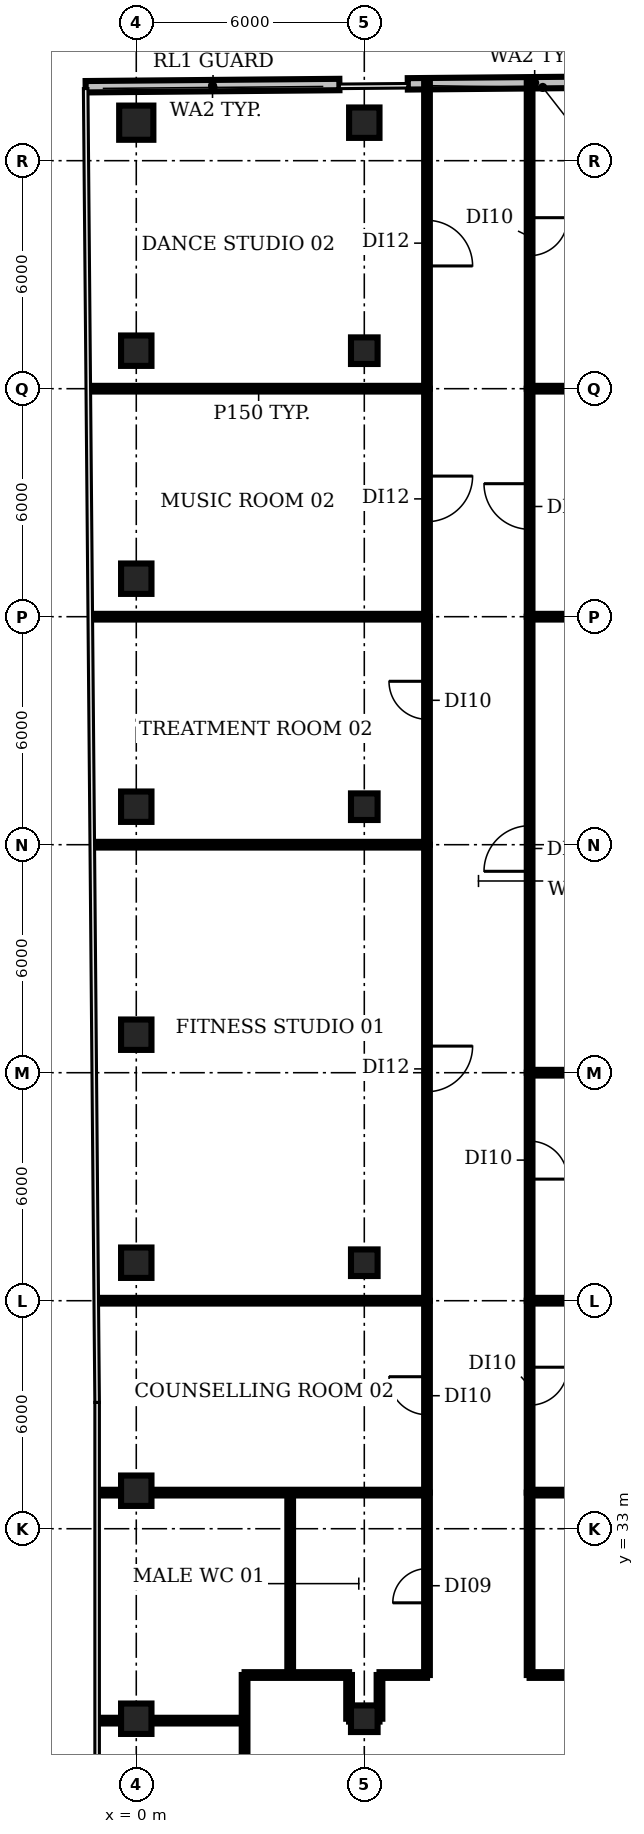
"""IFC4 building model, lengths in metres.
Left out: names, types, materials, properties, quantities, classifications, styles, units other than length and angle.
Written with IfcOpenShell. Run it as: python <this file> out.ifc"""

import sys

from ifc_helpers import new_model, si_unit, direction, frame, frame_2d, origin, origin_2d, place, context, subcontext, project, spatial, rectangle, circle, extrude, element, fill, save


model = new_model("IFC4")
c1 = context("Model", 3, precision=1e-05, world=origin(), true_north=direction((0.0, 1.0)))
c2 = subcontext(c1, "Body", "Model", "MODEL_VIEW")
j1 = project(units=[si_unit("LENGTHUNIT", "METRE"), si_unit("PLANEANGLEUNIT", "RADIAN")], contexts=[c1])
p1 = place(None, origin())
s1 = spatial("IfcSite", under=j1, at=p1, CompositionType="ELEMENT")
p2 = place(p1, origin())
s2 = spatial("IfcBuilding", under=s1, at=p2, CompositionType="ELEMENT")
p3 = place(p2, frame((0.0, 0.0, 226.4)))
s3 = spatial("IfcBuildingStorey", under=s2, at=p3, CompositionType="ELEMENT", Elevation=226.4)
for number, where, z_axis, x_axis in (
    (1, (0.0, 28.0, 0.0), (0.0, 0.0, 1.0), (1.0, 0.0, 0.0)),
    (2, (0.0, 34.0, 0.0), (0.0, 0.0, 1.0), (1.0, 0.0, 0.0)),
    (3, (0.0, 40.0, 0.0), (0.0, 0.0, 1.0), (1.0, 0.0, 0.0)),
    (4, (0.0, 46.0, 0.0), (0.0, 0.0, 1.0), (1.0, 0.0, 0.0)),
    (5, (0.0, 52.0, 0.0), (0.0, 0.0, 1.0), (1.0, 0.0, 0.0)),
    (6, (0.0, 58.0, 0.0), (0.0, 0.0, 1.0), (1.0, 0.0, 0.0)),
    (7, (0.0, 64.0, 0.0), (0.0, 0.0, 1.0), (1.0, 0.0, 0.0)),
):
    element("IfcColumn", number, at=place(p3, frame(where, z_axis=z_axis, x_axis=x_axis)), inside=s3, PredefinedType="COLUMN", context=c2, shape_type="SweptSolid", body=[
        extrude(rectangle(XDim=0.8, YDim=0.8, at=origin_2d()), origin(), (0.0, 0.0, 1.0), 3.85),
    ])
p4 = place(p3, frame((0.0, 70.0, 0.0), z_axis=(0.0, 0.0, 1.0), x_axis=(1.0, 0.0, 0.0)))
e8 = element("IfcColumn", 8, at=p4, inside=s3, PredefinedType="COLUMN", context=c2, shape_type="SweptSolid", body=[
    extrude(circle(Radius=0.45, at=origin_2d()), origin(), (0.0, 0.0, 1.0), 3.85),
])
for number, where, z_axis, x_axis in (
    (9, (6.0, 28.0, 0.0), (0.0, 0.0, 1.0), (1.0, 0.0, 0.0)),
    (10, (6.0, 40.0, 0.0), (0.0, 0.0, 1.0), (1.0, 0.0, 0.0)),
    (11, (6.0, 52.0, 0.0), (0.0, 0.0, 1.0), (1.0, 0.0, 0.0)),
    (12, (6.0, 64.0, 0.0), (0.0, 0.0, 1.0), (1.0, 0.0, 0.0)),
):
    element("IfcColumn", number, at=place(p3, frame(where, z_axis=z_axis, x_axis=x_axis)), inside=s3, PredefinedType="COLUMN", context=c2, shape_type="SweptSolid", body=[
        extrude(rectangle(XDim=0.7, YDim=0.7, at=origin_2d()), origin(), (0.0, 0.0, 1.0), 3.85),
    ])
p5 = place(p3, frame((6.0, 70.0, 0.0), z_axis=(0.0, 0.0, 1.0), x_axis=(1.0, 0.0, 0.0)))
e13 = element("IfcColumn", 13, at=p5, inside=s3, PredefinedType="COLUMN", context=c2, shape_type="SweptSolid", body=[
    extrude(rectangle(XDim=0.8, YDim=0.8, at=origin_2d()), origin(), (0.0, 0.0, 1.0), 3.85),
])
p6 = place(p3, frame((13.821, 71.08, 0.0), z_axis=(0.0, 0.0, 1.0), x_axis=(-0.999961815264, -0.008738879401, 0.0)))
e14 = element("IfcWall", 14, at=p6, inside=s3, PredefinedType="SOLIDWALL", context=c2, shape_type="SweptSolid", body=[
    extrude(rectangle(XDim=6.677, YDim=0.3, at=frame_2d((3.338, 0.0))), origin(), (0.0, 0.0, 1.0), 3.85),
])
p7 = place(p3, frame((5.345, 71.004, 0.0), z_axis=(0.0, 0.0, 1.0), x_axis=(-0.999961818057, -0.008738559893, 0.0)))
e15 = element("IfcWall", 15, at=p7, inside=s3, PredefinedType="SOLIDWALL", context=c2, shape_type="SweptSolid", body=[
    extrude(rectangle(XDim=6.677, YDim=0.3, at=frame_2d((3.339, 0.0))), origin(), (0.0, 0.0, 1.0), 3.85),
])
p8 = place(p3, frame((-1.21, 63.0, 0.0), z_axis=(0.0, 0.0, 1.0), x_axis=(1.0, 0.0, 0.0)))
e16 = element("IfcWall", 16, at=p8, inside=s3, PredefinedType="PARTITIONING", context=c2, shape_type="SweptSolid", body=[
    extrude(rectangle(XDim=8.86, YDim=0.15, at=frame_2d((4.43, 0.0))), origin(), (0.0, 0.0, 1.0), 2.88),
])
p9 = place(p3, frame((-1.16, 57.0, 0.0), z_axis=(0.0, 0.0, 1.0), x_axis=(1.0, 0.0, 0.0)))
e17 = element("IfcWall", 17, at=p9, inside=s3, PredefinedType="PARTITIONING", context=c2, shape_type="SweptSolid", body=[
    extrude(rectangle(XDim=8.81, YDim=0.15, at=frame_2d((4.405, 0.0))), origin(), (0.0, 0.0, 1.0), 2.88),
])
p10 = place(p3, frame((-1.11, 51.0, 0.0), z_axis=(0.0, 0.0, 1.0), x_axis=(1.0, 0.0, 0.0)))
e18 = element("IfcWall", 18, at=p10, inside=s3, PredefinedType="PARTITIONING", context=c2, shape_type="SweptSolid", body=[
    extrude(rectangle(XDim=8.76, YDim=0.15, at=frame_2d((4.38, 0.0))), origin(), (0.0, 0.0, 1.0), 2.88),
])
p11 = place(p3, frame((-1.0, 39.0, 0.0), z_axis=(0.0, 0.0, 1.0), x_axis=(1.0, 0.0, 0.0)))
e19 = element("IfcWall", 19, at=p11, inside=s3, PredefinedType="PARTITIONING", context=c2, shape_type="SweptSolid", body=[
    extrude(rectangle(XDim=8.65, YDim=0.15, at=frame_2d((4.325, 0.0))), origin(), (0.0, 0.0, 1.0), 2.88),
])
p12 = place(p3, frame((-0.98, 27.95, 0.0), z_axis=(0.0, 0.0, 1.0), x_axis=(1.0, 0.0, 0.0)))
e20 = element("IfcWall", 20, at=p12, inside=s3, PredefinedType="PARTITIONING", context=c2, shape_type="SweptSolid", body=[
    extrude(rectangle(XDim=3.83, YDim=0.15, at=frame_2d((1.915, 0.0))), origin(), (0.0, 0.0, 1.0), 2.88),
])
p13 = place(p3, frame((-0.98, 33.95, 0.0), z_axis=(0.0, 0.0, 1.0), x_axis=(1.0, 0.0, 0.0)))
e21 = element("IfcWall", 21, at=p13, inside=s3, PredefinedType="PARTITIONING", context=c2, shape_type="SweptSolid", body=[
    extrude(rectangle(XDim=8.63, YDim=0.15, at=frame_2d((4.315, 0.0))), origin(), (0.0, 0.0, 1.0), 2.88),
])
p14 = place(p3, frame((2.85, 25.25, 0.0), z_axis=(0.0, 0.0, 1.0), x_axis=(0.0, 1.0, 0.0)))
e22 = element("IfcWall", 22, at=p14, inside=s3, PredefinedType="PARTITIONING", context=c2, shape_type="SweptSolid", body=[
    extrude(rectangle(XDim=3.9, YDim=0.15, at=frame_2d((1.95, 0.0))), origin(), (0.0, 0.0, 1.0), 2.88),
])
p15 = place(p3, frame((2.85, 29.15, 0.0), z_axis=(0.0, 0.0, 1.0), x_axis=(1.0, 0.0, 0.0)))
e23 = element("IfcWall", 23, at=p15, inside=s3, PredefinedType="PARTITIONING", context=c2, shape_type="SweptSolid", body=[
    extrude(rectangle(XDim=2.75, YDim=0.15, at=frame_2d((1.375, 0.0))), origin(), (0.0, 0.0, 1.0), 2.88),
])
p16 = place(p3, frame((4.05, 29.15, 0.0), z_axis=(0.0, 0.0, 1.0), x_axis=(0.0, 1.0, 0.0)))
e24 = element("IfcWall", 24, at=p16, inside=s3, PredefinedType="PARTITIONING", context=c2, shape_type="SweptSolid", body=[
    extrude(rectangle(XDim=4.8, YDim=0.15, at=frame_2d((2.4, 0.0))), origin(), (0.0, 0.0, 1.0), 2.88),
])
p17 = place(p3, frame((5.6, 28.0, 0.0), z_axis=(0.0, 0.0, 1.0), x_axis=(0.0, 1.0, 0.0)))
e25 = element("IfcWall", 25, at=p17, inside=s3, PredefinedType="PARTITIONING", context=c2, shape_type="SweptSolid", body=[
    extrude(rectangle(XDim=1.15, YDim=0.15, at=frame_2d((0.575, 0.0))), origin(), (0.0, 0.0, 1.0), 2.88),
])
p18 = place(p3, frame((5.6, 28.0, 0.0), z_axis=(0.0, 0.0, 1.0), x_axis=(1.0, 0.0, 0.0)))
e26 = element("IfcWall", 26, at=p18, inside=s3, PredefinedType="PARTITIONING", context=c2, shape_type="SweptSolid", body=[
    extrude(rectangle(XDim=0.8, YDim=0.15, at=frame_2d((0.4, 0.0))), origin(), (0.0, 0.0, 1.0), 2.88),
])
p19 = place(p3, frame((6.4, 28.0, 0.0), z_axis=(0.0, 0.0, 1.0), x_axis=(0.0, 1.0, 0.0)))
e27 = element("IfcWall", 27, at=p19, inside=s3, PredefinedType="PARTITIONING", context=c2, shape_type="SweptSolid", body=[
    extrude(rectangle(XDim=1.15, YDim=0.15, at=frame_2d((0.575, 0.0))), origin(), (0.0, 0.0, 1.0), 2.88),
])
p20 = place(p3, frame((6.4, 29.15, 0.0), z_axis=(0.0, 0.0, 1.0), x_axis=(1.0, 0.0, 0.0)))
e28 = element("IfcWall", 28, at=p20, inside=s3, PredefinedType="PARTITIONING", context=c2, shape_type="SweptSolid", body=[
    extrude(rectangle(XDim=1.25, YDim=0.15, at=frame_2d((0.625, 0.0))), origin(), (0.0, 0.0, 1.0), 2.88),
])
p21 = place(p3, frame((7.65, 29.15, 0.0), z_axis=(0.0, 0.0, 1.0), x_axis=(0.0, 1.0, 0.0)))
e29 = element("IfcWall", 29, at=p21, inside=s3, PredefinedType="PARTITIONING", context=c2, shape_type="SweptSolid", body=[
    extrude(rectangle(XDim=4.8, YDim=0.15, at=frame_2d((2.4, 0.0))), origin(), (0.0, 0.0, 1.0), 2.88),
])
p22 = place(p21, frame((1.9, 0.0, 0.0)))
e30 = element("IfcOpeningElement", 30, at=p22, cuts=e29, PredefinedType="OPENING", context=c2, shape_type="SweptSolid", body=[
    extrude(rectangle(XDim=0.9, YDim=2.1, at=frame_2d((0.45, 1.05))), frame((0.0, 0.085, 0.0), z_axis=(0.0, -1.0, 0.0), x_axis=(1.0, 0.0, 0.0)), (0.0, 0.0, 1.0), 0.17),
])
p23 = place(p3, frame((7.65, 33.95, 0.0), z_axis=(0.0, 0.0, 1.0), x_axis=(0.0, 1.0, 0.0)))
e31 = element("IfcWall", 31, at=p23, inside=s3, PredefinedType="PARTITIONING", context=c2, shape_type="SweptSolid", body=[
    extrude(rectangle(XDim=5.05, YDim=0.15, at=frame_2d((2.525, 0.0))), origin(), (0.0, 0.0, 1.0), 2.88),
])
p24 = place(p23, frame((2.05, 0.0, 0.0)))
e32 = element("IfcOpeningElement", 32, at=p24, cuts=e31, PredefinedType="OPENING", context=c2, shape_type="SweptSolid", body=[
    extrude(rectangle(XDim=1.0, YDim=2.1, at=frame_2d((0.5, 1.05))), frame((0.0, 0.085, 0.0), z_axis=(0.0, -1.0, 0.0), x_axis=(1.0, 0.0, 0.0)), (0.0, 0.0, 1.0), 0.17),
])
p25 = place(p3, frame((7.65, 51.0, 0.0), z_axis=(0.0, 0.0, 1.0), x_axis=(0.0, -1.0, 0.0)))
e33 = element("IfcWall", 33, at=p25, inside=s3, PredefinedType="PARTITIONING", context=c2, shape_type="SweptSolid", body=[
    extrude(rectangle(XDim=12.0, YDim=0.15, at=frame_2d((6.0, 0.0))), origin(), (0.0, 0.0, 1.0), 2.88),
])
p26 = place(p25, frame((5.3, 0.0, 0.0)))
e34 = element("IfcOpeningElement", 34, at=p26, cuts=e33, PredefinedType="OPENING", context=c2, shape_type="SweptSolid", body=[
    extrude(rectangle(XDim=1.2, YDim=2.1, at=frame_2d((0.6, 1.05))), frame((0.0, 0.085, 0.0), z_axis=(0.0, -1.0, 0.0), x_axis=(1.0, 0.0, 0.0)), (0.0, 0.0, 1.0), 0.17),
])
p27 = place(p3, frame((7.65, 51.0, 0.0), z_axis=(0.0, 0.0, 1.0), x_axis=(0.0, 1.0, 0.0)))
e35 = element("IfcWall", 35, at=p27, inside=s3, PredefinedType="PARTITIONING", context=c2, shape_type="SweptSolid", body=[
    extrude(rectangle(XDim=6.0, YDim=0.15, at=frame_2d((3.0, 0.0))), origin(), (0.0, 0.0, 1.0), 2.88),
])
p28 = place(p27, frame((3.3, 0.0, 0.0)))
e36 = element("IfcOpeningElement", 36, at=p28, cuts=e35, PredefinedType="OPENING", context=c2, shape_type="SweptSolid", body=[
    extrude(rectangle(XDim=1.0, YDim=2.1, at=frame_2d((0.5, 1.05))), frame((0.0, 0.085, 0.0), z_axis=(0.0, -1.0, 0.0), x_axis=(1.0, 0.0, 0.0)), (0.0, 0.0, 1.0), 0.17),
])
p29 = place(p3, frame((7.65, 63.0, 0.0), z_axis=(0.0, 0.0, 1.0), x_axis=(0.0, -1.0, 0.0)))
e37 = element("IfcWall", 37, at=p29, inside=s3, PredefinedType="PARTITIONING", context=c2, shape_type="SweptSolid", body=[
    extrude(rectangle(XDim=6.0, YDim=0.15, at=frame_2d((3.0, 0.0))), origin(), (0.0, 0.0, 1.0), 2.88),
])
p30 = place(p29, frame((2.3, 0.0, 0.0)))
e38 = element("IfcOpeningElement", 38, at=p30, cuts=e37, PredefinedType="OPENING", context=c2, shape_type="SweptSolid", body=[
    extrude(rectangle(XDim=1.2, YDim=2.1, at=frame_2d((0.6, 1.05))), frame((0.0, 0.085, 0.0), z_axis=(0.0, -1.0, 0.0), x_axis=(1.0, 0.0, 0.0)), (0.0, 0.0, 1.0), 0.17),
])
p31 = place(p3, frame((7.65, 71.036, 0.0), z_axis=(0.0, 0.0, 1.0), x_axis=(0.0, -1.0, 0.0)))
e39 = element("IfcWall", 39, at=p31, inside=s3, PredefinedType="PARTITIONING", context=c2, shape_type="SweptSolid", body=[
    extrude(rectangle(XDim=8.036, YDim=0.15, at=frame_2d((4.018, 0.0))), origin(), (0.0, 0.0, 1.0), 2.88),
])
p32 = place(p31, frame((3.606, 0.0, 0.0)))
e40 = element("IfcOpeningElement", 40, at=p32, cuts=e39, PredefinedType="OPENING", context=c2, shape_type="SweptSolid", body=[
    extrude(rectangle(XDim=1.2, YDim=2.1, at=frame_2d((0.6, 1.05))), frame((0.0, 0.085, 0.0), z_axis=(0.0, -1.0, 0.0), x_axis=(1.0, 0.0, 0.0)), (0.0, 0.0, 1.0), 0.17),
])
p33 = place(p3, frame((10.35, 29.15, 0.0), z_axis=(0.0, 0.0, 1.0), x_axis=(0.0, 1.0, 0.0)))
e41 = element("IfcWall", 41, at=p33, inside=s3, PredefinedType="PARTITIONING", context=c2, shape_type="SweptSolid", body=[
    extrude(rectangle(XDim=4.8, YDim=0.15, at=frame_2d((2.4, 0.0))), origin(), (0.0, 0.0, 1.0), 2.88),
])
p34 = place(p3, frame((10.35, 29.15, 0.0), z_axis=(0.0, 0.0, 1.0), x_axis=(1.0, 0.0, 0.0)))
e42 = element("IfcWall", 42, at=p34, inside=s3, PredefinedType="PARTITIONING", context=c2, shape_type="SweptSolid", body=[
    extrude(rectangle(XDim=1.25, YDim=0.15, at=frame_2d((0.625, 0.0))), origin(), (0.0, 0.0, 1.0), 2.88),
])
p35 = place(p3, frame((10.35, 33.95, 0.0), z_axis=(0.0, 0.0, 1.0), x_axis=(1.0, 0.0, 0.0)))
e43 = element("IfcWall", 43, at=p35, inside=s3, PredefinedType="PARTITIONING", context=c2, shape_type="SweptSolid", body=[
    extrude(rectangle(XDim=1.242, YDim=0.15, at=frame_2d((0.621, 0.0))), origin(), (0.0, 0.0, 1.0), 2.88),
])
p36 = place(p3, frame((10.35, 39.0, 0.0), z_axis=(0.0, 0.0, 1.0), x_axis=(0.0, -1.0, 0.0)))
e44 = element("IfcWall", 44, at=p36, inside=s3, PredefinedType="PARTITIONING", context=c2, shape_type="SweptSolid", body=[
    extrude(rectangle(XDim=5.05, YDim=0.15, at=frame_2d((2.525, 0.0))), origin(), (0.0, 0.0, 1.0), 2.88),
])
p37 = place(p36, frame((1.75, 0.0, 0.0)))
e45 = element("IfcOpeningElement", 45, at=p37, cuts=e44, PredefinedType="OPENING", context=c2, shape_type="SweptSolid", body=[
    extrude(rectangle(XDim=1.0, YDim=2.1, at=frame_2d((0.5, 1.05))), frame((0.0, 0.085, 0.0), z_axis=(0.0, -1.0, 0.0), x_axis=(1.0, 0.0, 0.0)), (0.0, 0.0, 1.0), 0.17),
])
p38 = place(p3, frame((10.35, 39.0, 0.0), z_axis=(0.0, 0.0, 1.0), x_axis=(1.0, 0.0, 0.0)))
e46 = element("IfcWall", 46, at=p38, inside=s3, PredefinedType="PARTITIONING", context=c2, shape_type="SweptSolid", body=[
    extrude(rectangle(XDim=14.63, YDim=0.15, at=frame_2d((7.315, 0.0))), origin(), (0.0, 0.0, 1.0), 2.88),
])
p39 = place(p3, frame((10.35, 45.0, 0.0), z_axis=(0.0, 0.0, 1.0), x_axis=(0.0, -1.0, 0.0)))
e47 = element("IfcWall", 47, at=p39, inside=s3, PredefinedType="PARTITIONING", context=c2, shape_type="SweptSolid", body=[
    extrude(rectangle(XDim=6.0, YDim=0.15, at=frame_2d((3.0, 0.0))), origin(), (0.0, 0.0, 1.0), 2.88),
])
p40 = place(p39, frame((1.8, 0.0, 0.0)))
e48 = element("IfcOpeningElement", 48, at=p40, cuts=e47, PredefinedType="OPENING", context=c2, shape_type="SweptSolid", body=[
    extrude(rectangle(XDim=1.0, YDim=2.1, at=frame_2d((0.5, 1.05))), frame((0.0, 0.085, 0.0), z_axis=(0.0, -1.0, 0.0), x_axis=(1.0, 0.0, 0.0)), (0.0, 0.0, 1.0), 0.17),
])
p41 = place(p3, frame((10.35, 45.0, 0.0), z_axis=(0.0, 0.0, 1.0), x_axis=(0.0, 1.0, 0.0)))
e49 = element("IfcWall", 49, at=p41, inside=s3, PredefinedType="PARTITIONING", context=c2, shape_type="SweptSolid", body=[
    extrude(rectangle(XDim=12.0, YDim=0.15, at=frame_2d((6.0, 0.0))), origin(), (0.0, 0.0, 1.0), 2.88),
])
p42 = place(p41, frame((5.3, 0.0, 0.0)))
e50 = element("IfcOpeningElement", 50, at=p42, cuts=e49, PredefinedType="OPENING", context=c2, shape_type="SweptSolid", body=[
    extrude(rectangle(XDim=1.2, YDim=2.1, at=frame_2d((0.6, 1.05))), frame((0.0, 0.085, 0.0), z_axis=(0.0, -1.0, 0.0), x_axis=(1.0, 0.0, 0.0)), (0.0, 0.0, 1.0), 0.17),
])
p43 = place(p3, frame((10.35, 45.0, 0.0), z_axis=(0.0, 0.0, 1.0), x_axis=(1.0, 0.0, 0.0)))
e51 = element("IfcWall", 51, at=p43, inside=s3, PredefinedType="PARTITIONING", context=c2, shape_type="SweptSolid", body=[
    extrude(rectangle(XDim=14.63, YDim=0.15, at=frame_2d((7.315, 0.0))), origin(), (0.0, 0.0, 1.0), 2.88),
])
p44 = place(p3, frame((10.35, 57.0, 0.0), z_axis=(0.0, 0.0, 1.0), x_axis=(0.0, 1.0, 0.0)))
e52 = element("IfcWall", 52, at=p44, inside=s3, PredefinedType="PARTITIONING", context=c2, shape_type="SweptSolid", body=[
    extrude(rectangle(XDim=6.0, YDim=0.15, at=frame_2d((3.0, 0.0))), origin(), (0.0, 0.0, 1.0), 2.88),
])
p45 = place(p44, frame((2.3, 0.0, 0.0)))
e53 = element("IfcOpeningElement", 53, at=p45, cuts=e52, PredefinedType="OPENING", context=c2, shape_type="SweptSolid", body=[
    extrude(rectangle(XDim=1.2, YDim=2.1, at=frame_2d((0.6, 1.05))), frame((0.0, 0.085, 0.0), z_axis=(0.0, -1.0, 0.0), x_axis=(1.0, 0.0, 0.0)), (0.0, 0.0, 1.0), 0.17),
])
for number, where, z_axis, x_axis in (
    (54, (10.35, 57.0, 0.0), (0.0, 0.0, 1.0), (1.0, 0.0, 0.0)),
    (55, (10.35, 63.0, 0.0), (0.0, 0.0, 1.0), (1.0, 0.0, 0.0)),
):
    element("IfcWall", number, at=place(p3, frame(where, z_axis=z_axis, x_axis=x_axis)), inside=s3, PredefinedType="PARTITIONING", context=c2, shape_type="SweptSolid", body=[
        extrude(rectangle(XDim=14.63, YDim=0.15, at=frame_2d((7.315, 0.0))), origin(), (0.0, 0.0, 1.0), 2.88),
    ])
p46 = place(p3, frame((10.35, 71.06, 0.0), z_axis=(0.0, 0.0, 1.0), x_axis=(0.0, -1.0, 0.0)))
e56 = element("IfcWall", 56, at=p46, inside=s3, PredefinedType="PARTITIONING", context=c2, shape_type="SweptSolid", body=[
    extrude(rectangle(XDim=8.06, YDim=0.15, at=frame_2d((4.03, 0.0))), origin(), (0.0, 0.0, 1.0), 2.88),
])
p47 = place(p46, frame((3.56, 0.0, 0.0)))
e57 = element("IfcOpeningElement", 57, at=p47, cuts=e56, PredefinedType="OPENING", context=c2, shape_type="SweptSolid", body=[
    extrude(rectangle(XDim=1.0, YDim=2.1, at=frame_2d((0.5, 1.05))), frame((0.0, 0.085, 0.0), z_axis=(0.0, -1.0, 0.0), x_axis=(1.0, 0.0, 0.0)), (0.0, 0.0, 1.0), 0.17),
])
p48 = place(p22, origin())
e58 = element("IfcDoor", 58, at=p48, inside=s3, OperationType="SINGLE_SWING_LEFT", PredefinedType="DOOR", context=c2, shape_type="SweptSolid", body=[
    extrude(rectangle(XDim=0.9, YDim=2.1, at=frame_2d((0.45, 1.05))), frame((0.0, 0.025, 0.0), z_axis=(0.0, -1.0, 0.0), x_axis=(1.0, 0.0, 0.0)), (0.0, 0.0, 1.0), 0.05),
])
fill(e30, e58)
p49 = place(p24, origin())
e59 = element("IfcDoor", 59, at=p49, inside=s3, OperationType="SINGLE_SWING_RIGHT", PredefinedType="DOOR", context=c2, shape_type="SweptSolid", body=[
    extrude(rectangle(XDim=1.0, YDim=2.1, at=frame_2d((0.5, 1.05))), frame((0.0, 0.025, 0.0), z_axis=(0.0, -1.0, 0.0), x_axis=(1.0, 0.0, 0.0)), (0.0, 0.0, 1.0), 0.05),
])
fill(e32, e59)
p50 = place(p26, origin())
e60 = element("IfcDoor", 60, at=p50, inside=s3, OperationType="SINGLE_SWING_LEFT", PredefinedType="DOOR", context=c2, shape_type="SweptSolid", body=[
    extrude(rectangle(XDim=1.2, YDim=2.1, at=frame_2d((0.6, 1.05))), frame((0.0, 0.025, 0.0), z_axis=(0.0, -1.0, 0.0), x_axis=(1.0, 0.0, 0.0)), (0.0, 0.0, 1.0), 0.05),
])
fill(e34, e60)
p51 = place(p28, origin())
e61 = element("IfcDoor", 61, at=p51, inside=s3, OperationType="SINGLE_SWING_RIGHT", PredefinedType="DOOR", context=c2, shape_type="SweptSolid", body=[
    extrude(rectangle(XDim=1.0, YDim=2.1, at=frame_2d((0.5, 1.05))), frame((0.0, 0.025, 0.0), z_axis=(0.0, -1.0, 0.0), x_axis=(1.0, 0.0, 0.0)), (0.0, 0.0, 1.0), 0.05),
])
fill(e36, e61)
p52 = place(p30, origin())
e62 = element("IfcDoor", 62, at=p52, inside=s3, OperationType="SINGLE_SWING_LEFT", PredefinedType="DOOR", context=c2, shape_type="SweptSolid", body=[
    extrude(rectangle(XDim=1.2, YDim=2.1, at=frame_2d((0.6, 1.05))), frame((0.0, 0.025, 0.0), z_axis=(0.0, -1.0, 0.0), x_axis=(1.0, 0.0, 0.0)), (0.0, 0.0, 1.0), 0.05),
])
fill(e38, e62)
p53 = place(p32, origin())
e63 = element("IfcDoor", 63, at=p53, inside=s3, OperationType="SINGLE_SWING_RIGHT", PredefinedType="DOOR", context=c2, shape_type="SweptSolid", body=[
    extrude(rectangle(XDim=1.2, YDim=2.1, at=frame_2d((0.6, 1.05))), frame((0.0, 0.025, 0.0), z_axis=(0.0, -1.0, 0.0), x_axis=(1.0, 0.0, 0.0)), (0.0, 0.0, 1.0), 0.05),
])
fill(e40, e63)
p54 = place(p37, origin())
e64 = element("IfcDoor", 64, at=p54, inside=s3, OperationType="SINGLE_SWING_LEFT", PredefinedType="DOOR", context=c2, shape_type="SweptSolid", body=[
    extrude(rectangle(XDim=1.0, YDim=2.1, at=frame_2d((0.5, 1.05))), frame((0.0, 0.025, 0.0), z_axis=(0.0, -1.0, 0.0), x_axis=(1.0, 0.0, 0.0)), (0.0, 0.0, 1.0), 0.05),
])
fill(e45, e64)
p55 = place(p40, origin())
e65 = element("IfcDoor", 65, at=p55, inside=s3, OperationType="SINGLE_SWING_RIGHT", PredefinedType="DOOR", context=c2, shape_type="SweptSolid", body=[
    extrude(rectangle(XDim=1.0, YDim=2.1, at=frame_2d((0.5, 1.05))), frame((0.0, 0.025, 0.0), z_axis=(0.0, -1.0, 0.0), x_axis=(1.0, 0.0, 0.0)), (0.0, 0.0, 1.0), 0.05),
])
fill(e48, e65)
p56 = place(p42, origin())
e66 = element("IfcDoor", 66, at=p56, inside=s3, OperationType="SINGLE_SWING_LEFT", PredefinedType="DOOR", context=c2, shape_type="SweptSolid", body=[
    extrude(rectangle(XDim=1.2, YDim=2.1, at=frame_2d((0.6, 1.05))), frame((0.0, 0.025, 0.0), z_axis=(0.0, -1.0, 0.0), x_axis=(1.0, 0.0, 0.0)), (0.0, 0.0, 1.0), 0.05),
])
fill(e50, e66)
p57 = place(p45, origin())
e67 = element("IfcDoor", 67, at=p57, inside=s3, OperationType="SINGLE_SWING_RIGHT", PredefinedType="DOOR", context=c2, shape_type="SweptSolid", body=[
    extrude(rectangle(XDim=1.2, YDim=2.1, at=frame_2d((0.6, 1.05))), frame((0.0, 0.025, 0.0), z_axis=(0.0, -1.0, 0.0), x_axis=(1.0, 0.0, 0.0)), (0.0, 0.0, 1.0), 0.05),
])
fill(e53, e67)
p58 = place(p47, origin())
e68 = element("IfcDoor", 68, at=p58, inside=s3, OperationType="SINGLE_SWING_LEFT", PredefinedType="DOOR", context=c2, shape_type="SweptSolid", body=[
    extrude(rectangle(XDim=1.0, YDim=2.1, at=frame_2d((0.5, 1.05))), frame((0.0, 0.025, 0.0), z_axis=(0.0, -1.0, 0.0), x_axis=(1.0, 0.0, 0.0)), (0.0, 0.0, 1.0), 0.05),
])
fill(e57, e68)
save(model, sys.argv[1])
